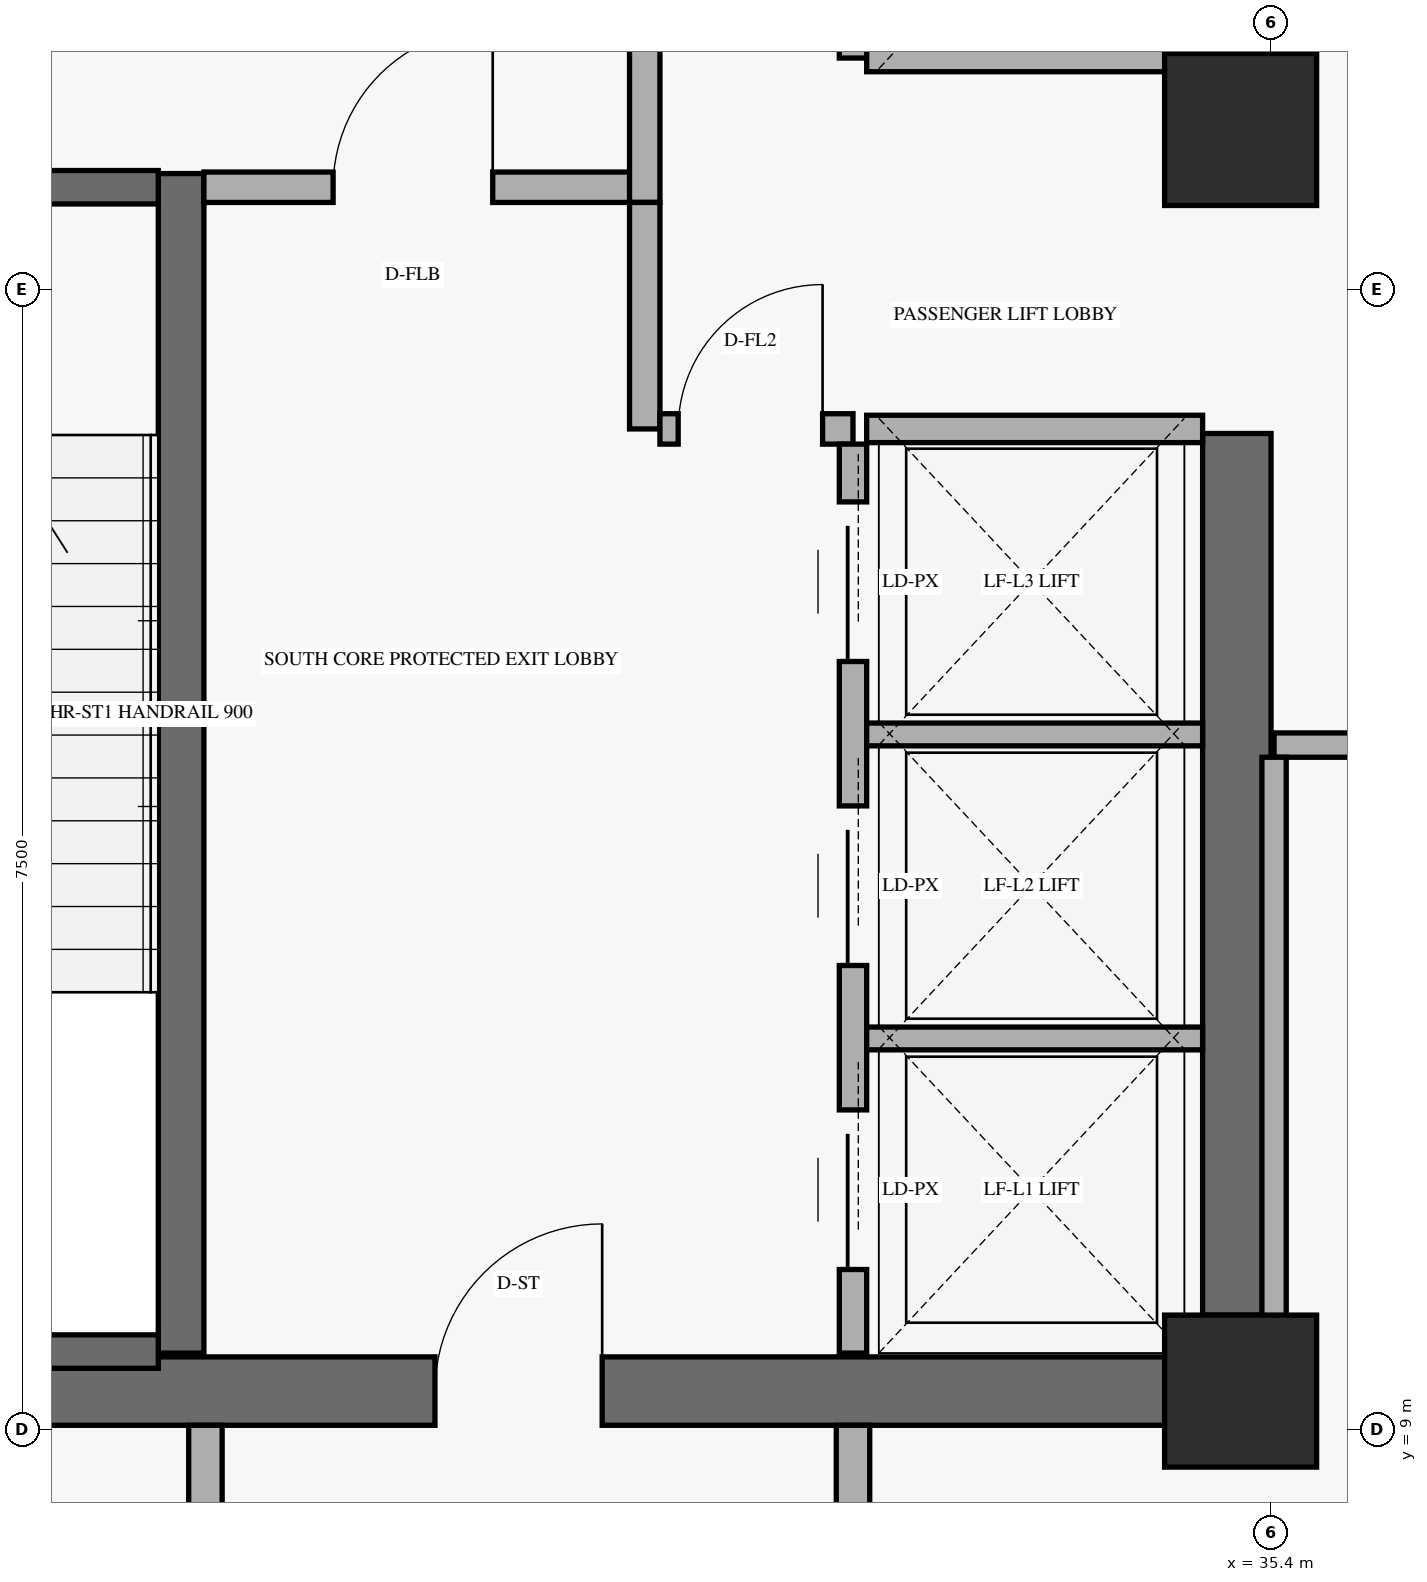
"""IFC4 building model, lengths in metres.
Left out: names, types, materials, properties, quantities, classifications, styles, units other than length and angle.
Written with IfcOpenShell. Run it as: python <this file> out.ifc"""

import sys

from ifc_helpers import new_model, si_unit, direction, frame, frame_2d, origin, origin_2d, place, context, subcontext, project, spatial, rectangle, extrude, element, fill, save


model = new_model("IFC4")
c1 = context("Model", 3, precision=1e-05, world=origin(), true_north=direction((0.0, 1.0)))
c2 = subcontext(c1, "Body", "Model", "MODEL_VIEW")
j1 = project(units=[si_unit("LENGTHUNIT", "METRE"), si_unit("PLANEANGLEUNIT", "RADIAN")], contexts=[c1])
p1 = place(None, origin())
s1 = spatial("IfcSite", under=j1, at=p1, CompositionType="ELEMENT")
p2 = place(p1, origin())
s2 = spatial("IfcBuilding", under=s1, at=p2, CompositionType="ELEMENT")
p3 = place(p2, origin())
s3 = spatial("IfcBuildingStorey", under=s2, at=p3, CompositionType="ELEMENT", Elevation=0.0)
p4 = place(p3, frame((35.175, 9.75, 0.0), z_axis=(0.0, 0.0, 1.0), x_axis=(0.0, 1.0, 0.0)))
e1 = element("IfcWall", 1, at=p4, inside=s3, PredefinedType="SHEAR", context=c2, shape_type="SweptSolid", body=[
    extrude(rectangle(XDim=5.8, YDim=0.45, at=frame_2d((2.9, 0.0))), origin(), (0.0, 0.0, 1.0), 3.539),
])
p5 = place(p3, frame((35.175, 18.05, 0.0), z_axis=(0.0, 0.0, 1.0), x_axis=(0.0, 1.0, 0.0)))
e2 = element("IfcWall", 2, at=p5, inside=s3, PredefinedType="SHEAR", context=c2, shape_type="SweptSolid", body=[
    extrude(rectangle(XDim=10.05, YDim=0.45, at=frame_2d((5.025, 0.0))), origin(), (0.0, 0.0, 1.0), 3.539),
])
p6 = place(p3, frame((24.7, 9.25, 0.0), z_axis=(0.0, 0.0, 1.0), x_axis=(1.0, 0.0, 0.0)))
e3 = element("IfcWall", 3, at=p6, inside=s3, PredefinedType="SHEAR", context=c2, shape_type="SweptSolid", body=[
    extrude(rectangle(XDim=10.0, YDim=0.45, at=frame_2d((5.0, 0.0))), origin(), (0.0, 0.0, 1.0), 4.39),
])
p7 = place(p6, frame((5.2, 0.0, 0.0)))
e4 = element("IfcOpeningElement", 4, at=p7, cuts=e3, PredefinedType="OPENING", context=c2, shape_type="SweptSolid", body=[
    extrude(rectangle(XDim=1.1, YDim=2.15, at=frame_2d((0.55, 1.075))), frame((0.0, 0.235, 0.0), z_axis=(0.0, -1.0, 0.0), x_axis=(1.0, 0.0, 0.0)), (0.0, 0.0, 1.0), 0.47),
])
p8 = place(p3, frame((28.23, 9.5, 0.0), z_axis=(0.0, 0.0, 1.0), x_axis=(0.0, 1.0, 0.0)))
e5 = element("IfcWall", 5, at=p8, inside=s3, PredefinedType="SHEAR", context=c2, shape_type="SweptSolid", body=[
    extrude(rectangle(XDim=7.76, YDim=0.3, at=frame_2d((3.88, 0.0))), origin(), (0.0, 0.0, 1.0), 4.39),
])
p9 = place(p3, frame((24.92, 9.51, 0.0), z_axis=(0.0, 0.0, 1.0), x_axis=(1.0, 0.0, 0.0)))
e6 = element("IfcWall", 6, at=p9, inside=s3, PredefinedType="SHEAR", context=c2, shape_type="SweptSolid", body=[
    extrude(rectangle(XDim=3.16, YDim=0.22, at=frame_2d((1.58, 0.0))), origin(), (0.0, 0.0, 1.0), 4.39),
])
p10 = place(p3, frame((24.92, 17.17, 0.0), z_axis=(0.0, 0.0, 1.0), x_axis=(1.0, 0.0, 0.0)))
e7 = element("IfcWall", 7, at=p10, inside=s3, PredefinedType="SHEAR", context=c2, shape_type="SweptSolid", body=[
    extrude(rectangle(XDim=3.16, YDim=0.22, at=frame_2d((1.58, 0.0))), origin(), (0.0, 0.0, 1.0), 4.39),
])
p11 = place(p10, frame((0.78, 0.0, 0.0)))
e8 = element("IfcOpeningElement", 8, at=p11, cuts=e7, PredefinedType="OPENING", context=c2, shape_type="SweptSolid", body=[
    extrude(rectangle(XDim=1.05, YDim=2.15, at=frame_2d((0.525, 1.075))), frame((0.0, 0.12, 0.0), z_axis=(0.0, -1.0, 0.0), x_axis=(1.0, 0.0, 0.0)), (0.0, 0.0, 1.0), 0.24),
])
for number, where, z_axis, x_axis in (
    (9, (35.2, 9.25, 0.0), (0.0, 0.0, 1.0), (1.0, 0.0, 0.0)),
    (10, (35.2, 17.55, 0.0), (0.0, 0.0, 1.0), (1.0, 0.0, 0.0)),
):
    element("IfcColumn", number, at=place(p3, frame(where, z_axis=z_axis, x_axis=x_axis)), inside=s3, PredefinedType="COLUMN", context=c2, shape_type="SweptSolid", body=[
        extrude(rectangle(XDim=1.0, YDim=1.0, at=origin_2d()), origin(), (0.0, 0.0, 1.0), 4.8),
    ])
p12 = place(p3, frame((28.38, 17.17, 0.0), z_axis=(0.0, 0.0, 1.0), x_axis=(1.0, 0.0, 0.0)))
e11 = element("IfcWall", 11, at=p12, inside=s3, PredefinedType="STANDARD", context=c2, shape_type="SweptSolid", body=[
    extrude(rectangle(XDim=2.9, YDim=0.2, at=frame_2d((1.45, 0.0))), origin(), (0.0, 0.0, 1.0), 4.39),
])
p13 = place(p12, frame((0.85, 0.0, 0.0)))
e12 = element("IfcOpeningElement", 12, at=p13, cuts=e11, PredefinedType="OPENING", context=c2, shape_type="SweptSolid", body=[
    extrude(rectangle(XDim=1.05, YDim=2.15, at=frame_2d((0.525, 1.075))), frame((0.0, 0.11, 0.0), z_axis=(0.0, -1.0, 0.0), x_axis=(1.0, 0.0, 0.0)), (0.0, 0.0, 1.0), 0.22),
])
p14 = place(p3, frame((31.28, 17.07, 0.0), z_axis=(0.0, 0.0, 1.0), x_axis=(0.0, 1.0, 0.0)))
e13 = element("IfcWall", 13, at=p14, inside=s3, PredefinedType="STANDARD", context=c2, shape_type="SweptSolid", body=[
    extrude(rectangle(XDim=3.92, YDim=0.2, at=frame_2d((1.96, 0.0))), origin(), (0.0, 0.0, 1.0), 3.272),
])
p15 = place(p14, frame((1.35, 0.0, 0.0)))
e14 = element("IfcOpeningElement", 14, at=p15, cuts=e13, PredefinedType="OPENING", context=c2, shape_type="SweptSolid", body=[
    extrude(rectangle(XDim=1.2, YDim=2.15, at=frame_2d((0.6, 1.075))), frame((0.0, 0.11, 0.0), z_axis=(0.0, -1.0, 0.0), x_axis=(1.0, 0.0, 0.0)), (0.0, 0.0, 1.0), 0.22),
])
p16 = place(p3, frame((31.28, 15.58, 0.0), z_axis=(0.0, 0.0, 1.0), x_axis=(0.0, 1.0, 0.0)))
e15 = element("IfcWall", 15, at=p16, inside=s3, PredefinedType="STANDARD", context=c2, shape_type="SweptSolid", body=[
    extrude(rectangle(XDim=1.49, YDim=0.2, at=frame_2d((0.745, 0.0))), origin(), (0.0, 0.0, 1.0), 4.39),
])
p17 = place(p3, frame((31.38, 15.58, 0.0), z_axis=(0.0, 0.0, 1.0), x_axis=(1.0, 0.0, 0.0)))
e16 = element("IfcWall", 16, at=p17, inside=s3, PredefinedType="STANDARD", context=c2, shape_type="SweptSolid", body=[
    extrude(rectangle(XDim=1.27, YDim=0.2, at=frame_2d((0.635, 0.0))), origin(), (0.0, 0.0, 1.0), 4.39),
])
p18 = place(p17, frame((0.12, 0.0, 0.0)))
e17 = element("IfcOpeningElement", 17, at=p18, cuts=e16, PredefinedType="OPENING", context=c2, shape_type="SweptSolid", body=[
    extrude(rectangle(XDim=0.95, YDim=2.15, at=frame_2d((0.475, 1.075))), frame((0.0, 0.11, 0.0), z_axis=(0.0, -1.0, 0.0), x_axis=(1.0, 0.0, 0.0)), (0.0, 0.0, 1.0), 0.22),
])
p19 = place(p3, frame((32.65, 9.5, 0.0), z_axis=(0.0, 0.0, 1.0), x_axis=(0.0, 1.0, 0.0)))
e18 = element("IfcWall", 18, at=p19, inside=s3, PredefinedType="STANDARD", context=c2, shape_type="SweptSolid", body=[
    extrude(rectangle(XDim=5.98, YDim=0.18, at=frame_2d((2.99, 0.0))), origin(), (0.0, 0.0, 1.0), 4.39),
])
p20 = place(p19, frame((0.55, 0.0, 0.0)))
e19 = element("IfcOpeningElement", 19, at=p20, cuts=e18, PredefinedType="OPENING", context=c2, shape_type="SweptSolid", body=[
    extrude(rectangle(XDim=1.05, YDim=2.2, at=frame_2d((0.525, 1.1))), frame((0.0, 0.1, 0.0), z_axis=(0.0, -1.0, 0.0), x_axis=(1.0, 0.0, 0.0)), (0.0, 0.0, 1.0), 0.2),
])
p21 = place(p19, frame((2.55, 0.0, 0.0)))
e20 = element("IfcOpeningElement", 20, at=p21, cuts=e18, PredefinedType="OPENING", context=c2, shape_type="SweptSolid", body=[
    extrude(rectangle(XDim=1.05, YDim=2.2, at=frame_2d((0.525, 1.1))), frame((0.0, 0.1, 0.0), z_axis=(0.0, -1.0, 0.0), x_axis=(1.0, 0.0, 0.0)), (0.0, 0.0, 1.0), 0.2),
])
p22 = place(p19, frame((4.55, 0.0, 0.0)))
e21 = element("IfcOpeningElement", 21, at=p22, cuts=e18, PredefinedType="OPENING", context=c2, shape_type="SweptSolid", body=[
    extrude(rectangle(XDim=1.05, YDim=2.2, at=frame_2d((0.525, 1.1))), frame((0.0, 0.1, 0.0), z_axis=(0.0, -1.0, 0.0), x_axis=(1.0, 0.0, 0.0)), (0.0, 0.0, 1.0), 0.2),
])
p23 = place(p3, frame((32.74, 15.58, 0.0), z_axis=(0.0, 0.0, 1.0), x_axis=(1.0, 0.0, 0.0)))
e22 = element("IfcWall", 22, at=p23, inside=s3, PredefinedType="STANDARD", context=c2, shape_type="SweptSolid", body=[
    extrude(rectangle(XDim=2.21, YDim=0.18, at=frame_2d((1.105, 0.0))), origin(), (0.0, 0.0, 1.0), 4.39),
])
for number, where, z_axis, x_axis in (
    (23, (32.74, 11.57, 0.0), (0.0, 0.0, 1.0), (1.0, 0.0, 0.0)),
    (24, (32.74, 13.57, 0.0), (0.0, 0.0, 1.0), (1.0, 0.0, 0.0)),
):
    element("IfcWall", number, at=place(p3, frame(where, z_axis=z_axis, x_axis=x_axis)), inside=s3, PredefinedType="STANDARD", context=c2, shape_type="SweptSolid", body=[
        extrude(rectangle(XDim=2.21, YDim=0.15, at=frame_2d((1.105, 0.0))), origin(), (0.0, 0.0, 1.0), 4.39),
    ])
p24 = place(p3, frame((32.65, 18.02, 0.0), z_axis=(0.0, 0.0, 1.0), x_axis=(0.0, 1.0, 0.0)))
e25 = element("IfcWall", 25, at=p24, inside=s3, PredefinedType="STANDARD", context=c2, shape_type="SweptSolid", body=[
    extrude(rectangle(XDim=10.06, YDim=0.18, at=frame_2d((5.03, 0.0))), origin(), (0.0, 0.0, 1.0), 4.39),
])
p25 = place(p24, frame((0.48, 0.0, 0.0)))
e26 = element("IfcOpeningElement", 26, at=p25, cuts=e25, PredefinedType="OPENING", context=c2, shape_type="SweptSolid", body=[
    extrude(rectangle(XDim=1.05, YDim=2.2, at=frame_2d((0.525, 1.1))), frame((0.0, 0.1, 0.0), z_axis=(0.0, -1.0, 0.0), x_axis=(1.0, 0.0, 0.0)), (0.0, 0.0, 1.0), 0.2),
])
p26 = place(p24, frame((2.48, 0.0, 0.0)))
e27 = element("IfcOpeningElement", 27, at=p26, cuts=e25, PredefinedType="OPENING", context=c2, shape_type="SweptSolid", body=[
    extrude(rectangle(XDim=1.05, YDim=2.2, at=frame_2d((0.525, 1.1))), frame((0.0, 0.1, 0.0), z_axis=(0.0, -1.0, 0.0), x_axis=(1.0, 0.0, 0.0)), (0.0, 0.0, 1.0), 0.2),
])
p27 = place(p24, frame((4.48, 0.0, 0.0)))
e28 = element("IfcOpeningElement", 28, at=p27, cuts=e25, PredefinedType="OPENING", context=c2, shape_type="SweptSolid", body=[
    extrude(rectangle(XDim=1.05, YDim=2.2, at=frame_2d((0.525, 1.1))), frame((0.0, 0.1, 0.0), z_axis=(0.0, -1.0, 0.0), x_axis=(1.0, 0.0, 0.0)), (0.0, 0.0, 1.0), 0.2),
])
p28 = place(p24, frame((6.53, 0.0, 0.0)))
e29 = element("IfcOpeningElement", 29, at=p28, cuts=e25, PredefinedType="OPENING", context=c2, shape_type="SweptSolid", body=[
    extrude(rectangle(XDim=1.05, YDim=2.2, at=frame_2d((0.525, 1.1))), frame((0.0, 0.1, 0.0), z_axis=(0.0, -1.0, 0.0), x_axis=(1.0, 0.0, 0.0)), (0.0, 0.0, 1.0), 0.2),
])
p29 = place(p24, frame((8.53, 0.0, 0.0)))
e30 = element("IfcOpeningElement", 30, at=p29, cuts=e25, PredefinedType="OPENING", context=c2, shape_type="SweptSolid", body=[
    extrude(rectangle(XDim=1.05, YDim=2.2, at=frame_2d((0.525, 1.1))), frame((0.0, 0.1, 0.0), z_axis=(0.0, -1.0, 0.0), x_axis=(1.0, 0.0, 0.0)), (0.0, 0.0, 1.0), 0.2),
])
p30 = place(p3, frame((32.74, 18.02, 0.0), z_axis=(0.0, 0.0, 1.0), x_axis=(1.0, 0.0, 0.0)))
e31 = element("IfcWall", 31, at=p30, inside=s3, PredefinedType="STANDARD", context=c2, shape_type="SweptSolid", body=[
    extrude(rectangle(XDim=2.21, YDim=0.18, at=frame_2d((1.105, 0.0))), origin(), (0.0, 0.0, 1.0), 4.39),
])
p31 = place(p3, frame((28.39, 0.32, 0.0), z_axis=(0.0, 0.0, 1.0), x_axis=(0.0, 1.0, 0.0)))
e32 = element("IfcWall", 32, at=p31, inside=s3, PredefinedType="STANDARD", context=c2, shape_type="SweptSolid", body=[
    extrude(rectangle(XDim=8.705, YDim=0.22, at=frame_2d((4.353, 0.0))), origin(), (0.0, 0.0, 1.0), 3.761),
])
p32 = place(p3, frame((32.65, 0.32, 0.0), z_axis=(0.0, 0.0, 1.0), x_axis=(0.0, 1.0, 0.0)))
e33 = element("IfcWall", 33, at=p32, inside=s3, PredefinedType="STANDARD", context=c2, shape_type="SweptSolid", body=[
    extrude(rectangle(XDim=8.705, YDim=0.22, at=frame_2d((4.353, 0.0))), origin(), (0.0, 0.0, 1.0), 3.761),
])
p33 = place(p32, frame((4.3, 0.0, 0.0)))
e34 = element("IfcOpeningElement", 34, at=p33, cuts=e33, PredefinedType="OPENING", context=c2, shape_type="SweptSolid", body=[
    extrude(rectangle(XDim=1.05, YDim=2.15, at=frame_2d((0.525, 1.075))), frame((0.0, 0.12, 0.0), z_axis=(0.0, -1.0, 0.0), x_axis=(1.0, 0.0, 0.0)), (0.0, 0.0, 1.0), 0.24),
])
p34 = place(p3, frame((35.42, 13.5, 0.0), z_axis=(0.0, 0.0, 1.0), x_axis=(1.0, 0.0, 0.0)))
e35 = element("IfcWall", 35, at=p34, inside=s3, PredefinedType="PARTITIONING", context=c2, shape_type="SweptSolid", body=[
    extrude(rectangle(XDim=20.26, YDim=0.16, at=frame_2d((10.13, 0.0))), origin(), (0.0, 0.0, 1.0), 3.521),
])
p35 = place(p34, frame((2.2, 0.0, 0.0)))
e36 = element("IfcOpeningElement", 36, at=p35, cuts=e35, PredefinedType="OPENING", context=c2, shape_type="SweptSolid", body=[
    extrude(rectangle(XDim=0.95, YDim=2.15, at=frame_2d((0.475, 1.075))), frame((0.0, 0.09, 0.0), z_axis=(0.0, -1.0, 0.0), x_axis=(1.0, 0.0, 0.0)), (0.0, 0.0, 1.0), 0.18),
])
p36 = place(p34, frame((12.2, 0.0, 0.0)))
e37 = element("IfcOpeningElement", 37, at=p36, cuts=e35, PredefinedType="OPENING", context=c2, shape_type="SweptSolid", body=[
    extrude(rectangle(XDim=0.95, YDim=2.15, at=frame_2d((0.475, 1.075))), frame((0.0, 0.09, 0.0), z_axis=(0.0, -1.0, 0.0), x_axis=(1.0, 0.0, 0.0)), (0.0, 0.0, 1.0), 0.18),
])
p37 = place(p3, frame((35.42, 9.25, 0.0), z_axis=(0.0, 0.0, 1.0), x_axis=(0.0, 1.0, 0.0)))
e38 = element("IfcWall", 38, at=p37, inside=s3, PredefinedType="PARTITIONING", context=c2, shape_type="SweptSolid", body=[
    extrude(rectangle(XDim=4.17, YDim=0.16, at=frame_2d((2.085, 0.0))), origin(), (0.0, 0.0, 1.0), 3.521),
])
p38 = place(p13, origin())
e39 = element("IfcDoor", 39, at=p38, inside=s3, OperationType="SINGLE_SWING_RIGHT", PredefinedType="DOOR", context=c2, shape_type="SweptSolid", body=[
    extrude(rectangle(XDim=1.05, YDim=2.15, at=frame_2d((0.525, 1.075))), frame((0.0, 0.025, 0.0), z_axis=(0.0, -1.0, 0.0), x_axis=(1.0, 0.0, 0.0)), (0.0, 0.0, 1.0), 0.05),
])
fill(e12, e39)
p39 = place(p18, frame((0.95, 0.0, 0.0), z_axis=(0.0, 0.0, 1.0), x_axis=(-1.0, 0.0, 0.0)))
e40 = element("IfcDoor", 40, at=p39, inside=s3, OperationType="SINGLE_SWING_LEFT", PredefinedType="DOOR", context=c2, shape_type="SweptSolid", body=[
    extrude(rectangle(XDim=0.95, YDim=2.15, at=frame_2d((0.475, 1.075))), frame((0.0, 0.025, 0.0), z_axis=(0.0, -1.0, 0.0), x_axis=(1.0, 0.0, 0.0)), (0.0, 0.0, 1.0), 0.05),
])
fill(e17, e40)
p40 = place(p20, origin())
e41 = element("IfcDoor", 41, at=p40, inside=s3, OperationType="SLIDING_TO_LEFT", PredefinedType="DOOR", context=c2, shape_type="SweptSolid", body=[
    extrude(rectangle(XDim=1.05, YDim=2.2, at=frame_2d((0.525, 1.1))), frame((0.0, 0.025, 0.0), z_axis=(0.0, -1.0, 0.0), x_axis=(1.0, 0.0, 0.0)), (0.0, 0.0, 1.0), 0.05),
])
fill(e19, e41)
p41 = place(p21, origin())
e42 = element("IfcDoor", 42, at=p41, inside=s3, OperationType="SLIDING_TO_LEFT", PredefinedType="DOOR", context=c2, shape_type="SweptSolid", body=[
    extrude(rectangle(XDim=1.05, YDim=2.2, at=frame_2d((0.525, 1.1))), frame((0.0, 0.025, 0.0), z_axis=(0.0, -1.0, 0.0), x_axis=(1.0, 0.0, 0.0)), (0.0, 0.0, 1.0), 0.05),
])
fill(e20, e42)
p42 = place(p22, origin())
e43 = element("IfcDoor", 43, at=p42, inside=s3, OperationType="SLIDING_TO_LEFT", PredefinedType="DOOR", context=c2, shape_type="SweptSolid", body=[
    extrude(rectangle(XDim=1.05, YDim=2.2, at=frame_2d((0.525, 1.1))), frame((0.0, 0.025, 0.0), z_axis=(0.0, -1.0, 0.0), x_axis=(1.0, 0.0, 0.0)), (0.0, 0.0, 1.0), 0.05),
])
fill(e21, e43)
p43 = place(p7, frame((1.1, 0.0, 0.0), z_axis=(0.0, 0.0, 1.0), x_axis=(-1.0, 0.0, 0.0)))
e44 = element("IfcDoor", 44, at=p43, inside=s3, OperationType="SINGLE_SWING_LEFT", PredefinedType="DOOR", context=c2, shape_type="SweptSolid", body=[
    extrude(rectangle(XDim=1.1, YDim=2.15, at=frame_2d((0.55, 1.075))), frame((0.0, 0.025, 0.0), z_axis=(0.0, -1.0, 0.0), x_axis=(1.0, 0.0, 0.0)), (0.0, 0.0, 1.0), 0.05),
])
fill(e4, e44)
save(model, sys.argv[1])
